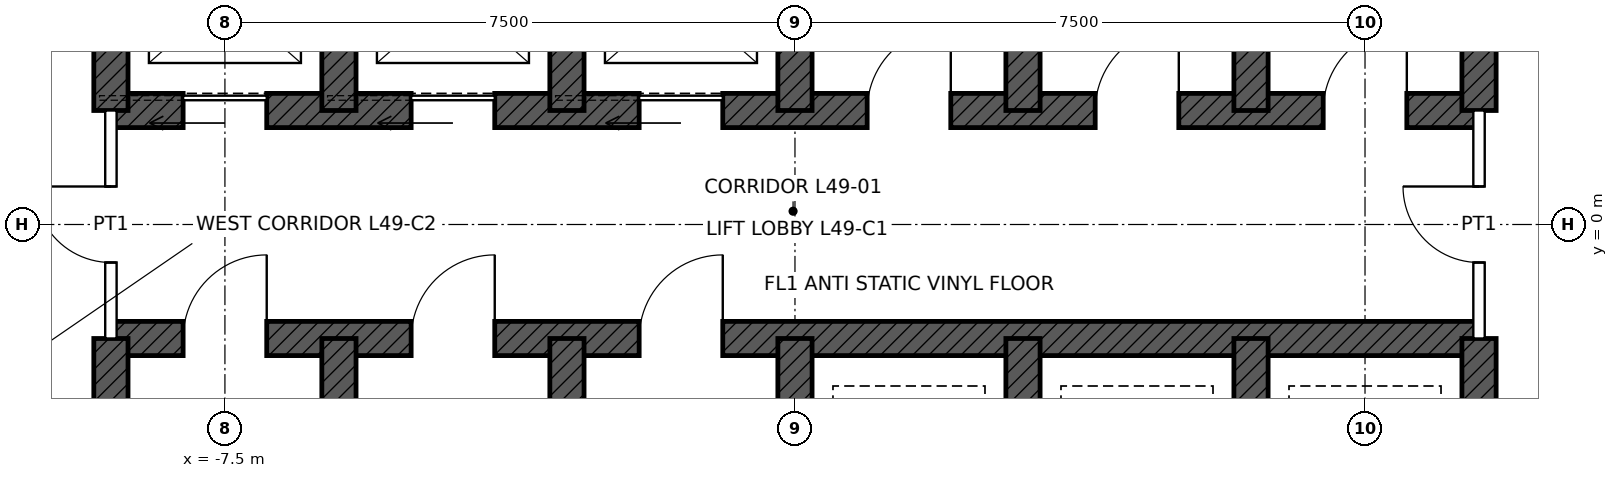
"""IFC4 building model, lengths in metres.
Left out: names, types, materials, properties, quantities, classifications, styles, units other than length and angle.
Written with IfcOpenShell. Run it as: python <this file> out.ifc"""

import sys

from ifc_helpers import new_model, si_unit, direction, frame, frame_2d, origin, place, context, subcontext, project, spatial, rectangle, extrude, element, fill, save


model = new_model("IFC4")
c1 = context("Model", 3, precision=1e-05, world=origin(), true_north=direction((0.0, 1.0)))
c2 = subcontext(c1, "Body", "Model", "MODEL_VIEW")
j1 = project(units=[si_unit("LENGTHUNIT", "METRE"), si_unit("PLANEANGLEUNIT", "RADIAN")], contexts=[c1])
p1 = place(None, origin())
s1 = spatial("IfcSite", under=j1, at=p1, CompositionType="ELEMENT")
p2 = place(p1, origin())
s2 = spatial("IfcBuilding", under=s1, at=p2, CompositionType="ELEMENT")
p3 = place(p2, frame((0.0, 0.0, 229.9)))
s3 = spatial("IfcBuildingStorey", under=s2, at=p3, CompositionType="ELEMENT", Elevation=229.9)
p4 = place(p3, frame((-9.0, 1.5, 0.0), z_axis=(0.0, 0.0, 1.0), x_axis=(1.0, 0.0, 0.0)))
e1 = element("IfcWall", 1, at=p4, inside=s3, PredefinedType="SHEAR", context=c2, shape_type="SweptSolid", body=[
    extrude(rectangle(XDim=18.0, YDim=0.45, at=frame_2d((9.0, 0.0))), origin(), (0.0, 0.0, 1.0), 4.0),
])
p5 = place(p4, frame((0.95, 0.0, 0.0)))
e2 = element("IfcOpeningElement", 2, at=p5, cuts=e1, PredefinedType="OPENING", context=c2, shape_type="SweptSolid", body=[
    extrude(rectangle(XDim=1.1, YDim=2.1, at=frame_2d((0.55, 1.05))), frame((0.0, 0.235, 0.0), z_axis=(0.0, -1.0, 0.0), x_axis=(1.0, 0.0, 0.0)), (0.0, 0.0, 1.0), 0.47),
])
p6 = place(p4, frame((3.95, 0.0, 0.0)))
e3 = element("IfcOpeningElement", 3, at=p6, cuts=e1, PredefinedType="OPENING", context=c2, shape_type="SweptSolid", body=[
    extrude(rectangle(XDim=1.1, YDim=2.1, at=frame_2d((0.55, 1.05))), frame((0.0, 0.235, 0.0), z_axis=(0.0, -1.0, 0.0), x_axis=(1.0, 0.0, 0.0)), (0.0, 0.0, 1.0), 0.47),
])
p7 = place(p4, frame((6.95, 0.0, 0.0)))
e4 = element("IfcOpeningElement", 4, at=p7, cuts=e1, PredefinedType="OPENING", context=c2, shape_type="SweptSolid", body=[
    extrude(rectangle(XDim=1.1, YDim=2.1, at=frame_2d((0.55, 1.05))), frame((0.0, 0.235, 0.0), z_axis=(0.0, -1.0, 0.0), x_axis=(1.0, 0.0, 0.0)), (0.0, 0.0, 1.0), 0.47),
])
p8 = place(p4, frame((9.95, 0.0, 0.0)))
e5 = element("IfcOpeningElement", 5, at=p8, cuts=e1, PredefinedType="OPENING", context=c2, shape_type="SweptSolid", body=[
    extrude(rectangle(XDim=1.1, YDim=2.1, at=frame_2d((0.55, 1.05))), frame((0.0, 0.235, 0.0), z_axis=(0.0, -1.0, 0.0), x_axis=(1.0, 0.0, 0.0)), (0.0, 0.0, 1.0), 0.47),
])
p9 = place(p4, frame((12.95, 0.0, 0.0)))
e6 = element("IfcOpeningElement", 6, at=p9, cuts=e1, PredefinedType="OPENING", context=c2, shape_type="SweptSolid", body=[
    extrude(rectangle(XDim=1.1, YDim=2.1, at=frame_2d((0.55, 1.05))), frame((0.0, 0.235, 0.0), z_axis=(0.0, -1.0, 0.0), x_axis=(1.0, 0.0, 0.0)), (0.0, 0.0, 1.0), 0.47),
])
p10 = place(p4, frame((15.95, 0.0, 0.0)))
e7 = element("IfcOpeningElement", 7, at=p10, cuts=e1, PredefinedType="OPENING", context=c2, shape_type="SweptSolid", body=[
    extrude(rectangle(XDim=1.1, YDim=2.1, at=frame_2d((0.55, 1.05))), frame((0.0, 0.235, 0.0), z_axis=(0.0, -1.0, 0.0), x_axis=(1.0, 0.0, 0.0)), (0.0, 0.0, 1.0), 0.47),
])
p11 = place(p3, frame((-9.0, -1.5, 0.0), z_axis=(0.0, 0.0, 1.0), x_axis=(1.0, 0.0, 0.0)))
e8 = element("IfcWall", 8, at=p11, inside=s3, PredefinedType="SHEAR", context=c2, shape_type="SweptSolid", body=[
    extrude(rectangle(XDim=18.0, YDim=0.45, at=frame_2d((9.0, 0.0))), origin(), (0.0, 0.0, 1.0), 4.0),
])
p12 = place(p11, frame((0.95, 0.0, 0.0)))
e9 = element("IfcOpeningElement", 9, at=p12, cuts=e8, PredefinedType="OPENING", context=c2, shape_type="SweptSolid", body=[
    extrude(rectangle(XDim=1.1, YDim=2.1, at=frame_2d((0.55, 1.05))), frame((0.0, 0.235, 0.0), z_axis=(0.0, -1.0, 0.0), x_axis=(1.0, 0.0, 0.0)), (0.0, 0.0, 1.0), 0.47),
])
p13 = place(p11, frame((3.95, 0.0, 0.0)))
e10 = element("IfcOpeningElement", 10, at=p13, cuts=e8, PredefinedType="OPENING", context=c2, shape_type="SweptSolid", body=[
    extrude(rectangle(XDim=1.1, YDim=2.1, at=frame_2d((0.55, 1.05))), frame((0.0, 0.235, 0.0), z_axis=(0.0, -1.0, 0.0), x_axis=(1.0, 0.0, 0.0)), (0.0, 0.0, 1.0), 0.47),
])
p14 = place(p11, frame((6.95, 0.0, 0.0)))
e11 = element("IfcOpeningElement", 11, at=p14, cuts=e8, PredefinedType="OPENING", context=c2, shape_type="SweptSolid", body=[
    extrude(rectangle(XDim=1.1, YDim=2.1, at=frame_2d((0.55, 1.05))), frame((0.0, 0.235, 0.0), z_axis=(0.0, -1.0, 0.0), x_axis=(1.0, 0.0, 0.0)), (0.0, 0.0, 1.0), 0.47),
])
for number, where, z_axis, x_axis in (
    (12, (-9.0, 1.5, 0.0), (0.0, 0.0, 1.0), (0.0, 1.0, 0.0)),
    (13, (9.0, 1.5, 0.0), (0.0, 0.0, 1.0), (0.0, 1.0, 0.0)),
    (14, (-9.0, -4.5, 0.0), (0.0, 0.0, 1.0), (0.0, 1.0, 0.0)),
    (15, (9.0, -4.5, 0.0), (0.0, 0.0, 1.0), (0.0, 1.0, 0.0)),
    (16, (-6.0, 1.5, 0.0), (0.0, 0.0, 1.0), (0.0, 1.0, 0.0)),
    (17, (-3.0, 1.5, 0.0), (0.0, 0.0, 1.0), (0.0, 1.0, 0.0)),
    (18, (0.0, 1.5, 0.0), (0.0, 0.0, 1.0), (0.0, 1.0, 0.0)),
    (19, (3.0, 1.5, 0.0), (0.0, 0.0, 1.0), (0.0, 1.0, 0.0)),
    (20, (6.0, 1.5, 0.0), (0.0, 0.0, 1.0), (0.0, 1.0, 0.0)),
    (21, (-6.0, -4.5, 0.0), (0.0, 0.0, 1.0), (0.0, 1.0, 0.0)),
    (22, (-3.0, -4.5, 0.0), (0.0, 0.0, 1.0), (0.0, 1.0, 0.0)),
    (23, (0.0, -4.5, 0.0), (0.0, 0.0, 1.0), (0.0, 1.0, 0.0)),
    (24, (3.0, -4.5, 0.0), (0.0, 0.0, 1.0), (0.0, 1.0, 0.0)),
    (25, (6.0, -4.5, 0.0), (0.0, 0.0, 1.0), (0.0, 1.0, 0.0)),
):
    element("IfcWall", number, at=place(p3, frame(where, z_axis=z_axis, x_axis=x_axis)), inside=s3, PredefinedType="SHEAR", context=c2, shape_type="SweptSolid", body=[
        extrude(rectangle(XDim=3.0, YDim=0.45, at=frame_2d((1.5, 0.0))), origin(), (0.0, 0.0, 1.0), 4.0),
    ])
p15 = place(p3, frame((-9.0, -1.5, 0.0), z_axis=(0.0, 0.0, 1.0), x_axis=(0.0, 1.0, 0.0)))
e26 = element("IfcWall", 26, at=p15, inside=s3, PredefinedType="PARTITIONING", context=c2, shape_type="SweptSolid", body=[
    extrude(rectangle(XDim=3.0, YDim=0.15, at=frame_2d((1.5, 0.0))), origin(), (0.0, 0.0, 1.0), 3.75),
])
p16 = place(p15, frame((1.0, 0.0, 0.0)))
e27 = element("IfcOpeningElement", 27, at=p16, cuts=e26, PredefinedType="OPENING", context=c2, shape_type="SweptSolid", body=[
    extrude(rectangle(XDim=1.0, YDim=2.4, at=frame_2d((0.5, 1.2))), frame((0.0, 0.085, 0.0), z_axis=(0.0, -1.0, 0.0), x_axis=(1.0, 0.0, 0.0)), (0.0, 0.0, 1.0), 0.17),
])
p17 = place(p3, frame((9.0, -1.5, 0.0), z_axis=(0.0, 0.0, 1.0), x_axis=(0.0, 1.0, 0.0)))
e28 = element("IfcWall", 28, at=p17, inside=s3, PredefinedType="PARTITIONING", context=c2, shape_type="SweptSolid", body=[
    extrude(rectangle(XDim=3.0, YDim=0.15, at=frame_2d((1.5, 0.0))), origin(), (0.0, 0.0, 1.0), 3.75),
])
p18 = place(p17, frame((1.0, 0.0, 0.0)))
e29 = element("IfcOpeningElement", 29, at=p18, cuts=e28, PredefinedType="OPENING", context=c2, shape_type="SweptSolid", body=[
    extrude(rectangle(XDim=1.0, YDim=2.4, at=frame_2d((0.5, 1.2))), frame((0.0, 0.085, 0.0), z_axis=(0.0, -1.0, 0.0), x_axis=(1.0, 0.0, 0.0)), (0.0, 0.0, 1.0), 0.17),
])
p19 = place(p5, origin())
e30 = element("IfcDoor", 30, at=p19, inside=s3, OperationType="SLIDING_TO_LEFT", PredefinedType="DOOR", context=c2, shape_type="SweptSolid", body=[
    extrude(rectangle(XDim=1.1, YDim=2.1, at=frame_2d((0.55, 1.05))), frame((0.0, 0.025, 0.0), z_axis=(0.0, -1.0, 0.0), x_axis=(1.0, 0.0, 0.0)), (0.0, 0.0, 1.0), 0.05),
])
fill(e2, e30)
p20 = place(p6, origin())
e31 = element("IfcDoor", 31, at=p20, inside=s3, OperationType="SLIDING_TO_LEFT", PredefinedType="DOOR", context=c2, shape_type="SweptSolid", body=[
    extrude(rectangle(XDim=1.1, YDim=2.1, at=frame_2d((0.55, 1.05))), frame((0.0, 0.025, 0.0), z_axis=(0.0, -1.0, 0.0), x_axis=(1.0, 0.0, 0.0)), (0.0, 0.0, 1.0), 0.05),
])
fill(e3, e31)
p21 = place(p7, origin())
e32 = element("IfcDoor", 32, at=p21, inside=s3, OperationType="SLIDING_TO_LEFT", PredefinedType="DOOR", context=c2, shape_type="SweptSolid", body=[
    extrude(rectangle(XDim=1.1, YDim=2.1, at=frame_2d((0.55, 1.05))), frame((0.0, 0.025, 0.0), z_axis=(0.0, -1.0, 0.0), x_axis=(1.0, 0.0, 0.0)), (0.0, 0.0, 1.0), 0.05),
])
fill(e4, e32)
p22 = place(p16, origin())
e33 = element("IfcDoor", 33, at=p22, inside=s3, OperationType="SINGLE_SWING_RIGHT", PredefinedType="DOOR", context=c2, shape_type="SweptSolid", body=[
    extrude(rectangle(XDim=1.0, YDim=2.4, at=frame_2d((0.5, 1.2))), frame((0.0, 0.025, 0.0), z_axis=(0.0, -1.0, 0.0), x_axis=(1.0, 0.0, 0.0)), (0.0, 0.0, 1.0), 0.05),
])
fill(e27, e33)
p23 = place(p18, origin())
e34 = element("IfcDoor", 34, at=p23, inside=s3, OperationType="SINGLE_SWING_RIGHT", PredefinedType="DOOR", context=c2, shape_type="SweptSolid", body=[
    extrude(rectangle(XDim=1.0, YDim=2.4, at=frame_2d((0.5, 1.2))), frame((0.0, 0.025, 0.0), z_axis=(0.0, -1.0, 0.0), x_axis=(1.0, 0.0, 0.0)), (0.0, 0.0, 1.0), 0.05),
])
fill(e29, e34)
p24 = place(p8, origin())
e35 = element("IfcDoor", 35, at=p24, inside=s3, OperationType="SINGLE_SWING_RIGHT", PredefinedType="DOOR", context=c2, shape_type="SweptSolid", body=[
    extrude(rectangle(XDim=1.1, YDim=2.1, at=frame_2d((0.55, 1.05))), frame((0.0, 0.025, 0.0), z_axis=(0.0, -1.0, 0.0), x_axis=(1.0, 0.0, 0.0)), (0.0, 0.0, 1.0), 0.05),
])
fill(e5, e35)
p25 = place(p9, origin())
e36 = element("IfcDoor", 36, at=p25, inside=s3, OperationType="SINGLE_SWING_RIGHT", PredefinedType="DOOR", context=c2, shape_type="SweptSolid", body=[
    extrude(rectangle(XDim=1.1, YDim=2.1, at=frame_2d((0.55, 1.05))), frame((0.0, 0.025, 0.0), z_axis=(0.0, -1.0, 0.0), x_axis=(1.0, 0.0, 0.0)), (0.0, 0.0, 1.0), 0.05),
])
fill(e6, e36)
p26 = place(p10, origin())
e37 = element("IfcDoor", 37, at=p26, inside=s3, OperationType="SINGLE_SWING_RIGHT", PredefinedType="DOOR", context=c2, shape_type="SweptSolid", body=[
    extrude(rectangle(XDim=1.1, YDim=2.1, at=frame_2d((0.55, 1.05))), frame((0.0, 0.025, 0.0), z_axis=(0.0, -1.0, 0.0), x_axis=(1.0, 0.0, 0.0)), (0.0, 0.0, 1.0), 0.05),
])
fill(e7, e37)
p27 = place(p12, origin())
e38 = element("IfcDoor", 38, at=p27, inside=s3, OperationType="SINGLE_SWING_RIGHT", PredefinedType="DOOR", context=c2, shape_type="SweptSolid", body=[
    extrude(rectangle(XDim=1.1, YDim=2.1, at=frame_2d((0.55, 1.05))), frame((0.0, 0.025, 0.0), z_axis=(0.0, -1.0, 0.0), x_axis=(1.0, 0.0, 0.0)), (0.0, 0.0, 1.0), 0.05),
])
fill(e9, e38)
p28 = place(p13, origin())
e39 = element("IfcDoor", 39, at=p28, inside=s3, OperationType="SINGLE_SWING_RIGHT", PredefinedType="DOOR", context=c2, shape_type="SweptSolid", body=[
    extrude(rectangle(XDim=1.1, YDim=2.1, at=frame_2d((0.55, 1.05))), frame((0.0, 0.025, 0.0), z_axis=(0.0, -1.0, 0.0), x_axis=(1.0, 0.0, 0.0)), (0.0, 0.0, 1.0), 0.05),
])
fill(e10, e39)
p29 = place(p14, origin())
e40 = element("IfcDoor", 40, at=p29, inside=s3, OperationType="SINGLE_SWING_RIGHT", PredefinedType="DOOR", context=c2, shape_type="SweptSolid", body=[
    extrude(rectangle(XDim=1.1, YDim=2.1, at=frame_2d((0.55, 1.05))), frame((0.0, 0.025, 0.0), z_axis=(0.0, -1.0, 0.0), x_axis=(1.0, 0.0, 0.0)), (0.0, 0.0, 1.0), 0.05),
])
fill(e11, e40)
save(model, sys.argv[1])
